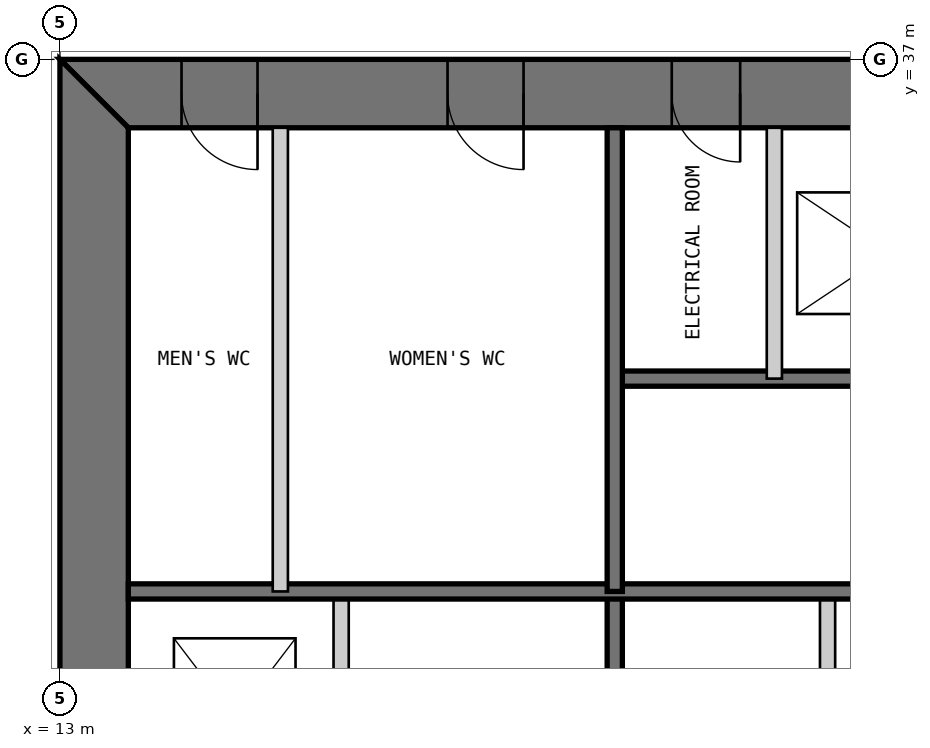
"""IFC4 building model, lengths in metres.
Left out: names, types, materials, properties, quantities, classifications, styles, units other than length and angle.
Written with IfcOpenShell. Run it as: python <this file> out.ifc"""

import sys

from ifc_helpers import new_model, si_unit, direction, frame, frame_2d, origin, place, context, subcontext, project, spatial, polyline, rectangle, outline, extrude, element, fill, save


model = new_model("IFC4")
c1 = context("Model", 3, precision=1e-05, world=origin(), true_north=direction((0.0, 1.0)))
c2 = subcontext(c1, "Body", "Model", "MODEL_VIEW")
j1 = project(units=[si_unit("LENGTHUNIT", "METRE"), si_unit("PLANEANGLEUNIT", "RADIAN")], contexts=[c1])
p1 = place(None, origin())
s1 = spatial("IfcSite", under=j1, at=p1, CompositionType="ELEMENT")
p2 = place(p1, origin())
s2 = spatial("IfcBuilding", under=s1, at=p2, CompositionType="ELEMENT")
p3 = place(p2, frame((0.0, 0.0, 79.0)))
s3 = spatial("IfcBuildingStorey", under=s2, at=p3, CompositionType="ELEMENT", Elevation=79.0)
p4 = place(p3, frame((37.0, 36.55, 0.0), z_axis=(0.0, 0.0, 1.0), x_axis=(-1.0, 0.0, 0.0)))
e1 = element("IfcWall", 1, at=p4, inside=s3, PredefinedType="SHEAR", context=c2, shape_type="SweptSolid", body=[
    extrude(outline(polyline([(0.0, -0.45), (24.0, -0.45), (23.1, 0.45), (0.9, 0.45), (0.0, -0.45)])), origin(), (0.0, 0.0, 1.0), 4.0),
])
p5 = place(p4, frame((4.9, 0.0, 0.0)))
e2 = element("IfcOpeningElement", 2, at=p5, cuts=e1, PredefinedType="OPENING", context=c2, shape_type="SweptSolid", body=[
    extrude(rectangle(XDim=1.0, YDim=2.2, at=frame_2d((0.5, 1.1))), frame((0.0, 0.46, 0.0), z_axis=(0.0, -1.0, 0.0), x_axis=(1.0, 0.0, 0.0)), (0.0, 0.0, 1.0), 0.92),
])
p6 = place(p4, frame((8.9, 0.0, 0.0)))
e3 = element("IfcOpeningElement", 3, at=p6, cuts=e1, PredefinedType="OPENING", context=c2, shape_type="SweptSolid", body=[
    extrude(rectangle(XDim=1.1, YDim=2.2, at=frame_2d((0.55, 1.1))), frame((0.0, 0.46, 0.0), z_axis=(0.0, -1.0, 0.0), x_axis=(1.0, 0.0, 0.0)), (0.0, 0.0, 1.0), 0.92),
])
p7 = place(p4, frame((15.05, 0.0, 0.0)))
e4 = element("IfcOpeningElement", 4, at=p7, cuts=e1, PredefinedType="OPENING", context=c2, shape_type="SweptSolid", body=[
    extrude(rectangle(XDim=0.9, YDim=2.2, at=frame_2d((0.45, 1.1))), frame((0.0, 0.46, 0.0), z_axis=(0.0, -1.0, 0.0), x_axis=(1.0, 0.0, 0.0)), (0.0, 0.0, 1.0), 0.92),
])
p8 = place(p4, frame((17.9, 0.0, 0.0)))
e5 = element("IfcOpeningElement", 5, at=p8, cuts=e1, PredefinedType="OPENING", context=c2, shape_type="SweptSolid", body=[
    extrude(rectangle(XDim=1.0, YDim=2.2, at=frame_2d((0.5, 1.1))), frame((0.0, 0.46, 0.0), z_axis=(0.0, -1.0, 0.0), x_axis=(1.0, 0.0, 0.0)), (0.0, 0.0, 1.0), 0.92),
])
p9 = place(p4, frame((21.4, 0.0, 0.0)))
e6 = element("IfcOpeningElement", 6, at=p9, cuts=e1, PredefinedType="OPENING", context=c2, shape_type="SweptSolid", body=[
    extrude(rectangle(XDim=1.0, YDim=2.2, at=frame_2d((0.5, 1.1))), frame((0.0, 0.46, 0.0), z_axis=(0.0, -1.0, 0.0), x_axis=(1.0, 0.0, 0.0)), (0.0, 0.0, 1.0), 0.92),
])
p10 = place(p3, frame((13.45, 36.1, 0.0), z_axis=(0.0, 0.0, 1.0), x_axis=(0.0, -1.0, 0.0)))
e7 = element("IfcWall", 7, at=p10, inside=s3, PredefinedType="SHEAR", context=c2, shape_type="SweptSolid", body=[
    extrude(outline(polyline([(-0.9, -0.45), (23.1, -0.45), (22.2, 0.45), (0.0, 0.45), (-0.9, -0.45)])), origin(), (0.0, 0.0, 1.0), 4.0),
])
p11 = place(p10, frame((20.2, 0.0, 0.0)))
e8 = element("IfcOpeningElement", 8, at=p11, cuts=e7, PredefinedType="OPENING", context=c2, shape_type="SweptSolid", body=[
    extrude(rectangle(XDim=1.0, YDim=2.2, at=frame_2d((0.5, 1.1))), frame((0.0, 0.46, 0.0), z_axis=(0.0, -1.0, 0.0), x_axis=(1.0, 0.0, 0.0)), (0.0, 0.0, 1.0), 0.92),
])
p12 = place(p10, frame((17.25, 0.0, 0.0)))
e9 = element("IfcOpeningElement", 9, at=p12, cuts=e7, PredefinedType="OPENING", context=c2, shape_type="SweptSolid", body=[
    extrude(rectangle(XDim=0.9, YDim=2.2, at=frame_2d((0.45, 1.1))), frame((0.0, 0.46, 0.0), z_axis=(0.0, -1.0, 0.0), x_axis=(1.0, 0.0, 0.0)), (0.0, 0.0, 1.0), 0.92),
])
p13 = place(p3, frame((16.7, 13.9, 0.0), z_axis=(0.0, 0.0, 1.0), x_axis=(0.0, 1.0, 0.0)))
e10 = element("IfcWall", 10, at=p13, inside=s3, PredefinedType="PARTITIONING", context=c2, shape_type="SweptSolid", body=[
    extrude(rectangle(XDim=16.1, YDim=0.2, at=frame_2d((8.05, 0.0))), origin(), (0.0, 0.0, 1.0), 3.8),
])
p14 = place(p13, frame((4.4, 0.0, 0.0)))
e11 = element("IfcOpeningElement", 11, at=p14, cuts=e10, PredefinedType="OPENING", context=c2, shape_type="SweptSolid", body=[
    extrude(rectangle(XDim=0.9, YDim=2.2, at=frame_2d((0.45, 1.1))), frame((0.0, 0.11, 0.0), z_axis=(0.0, -1.0, 0.0), x_axis=(1.0, 0.0, 0.0)), (0.0, 0.0, 1.0), 0.22),
])
p15 = place(p13, frame((7.217, 0.0, 0.0)))
e12 = element("IfcOpeningElement", 12, at=p15, cuts=e10, PredefinedType="OPENING", context=c2, shape_type="SweptSolid", body=[
    extrude(rectangle(XDim=1.1, YDim=2.2, at=frame_2d((0.55, 1.1))), frame((0.0, 0.11, 0.0), z_axis=(0.0, -1.0, 0.0), x_axis=(1.0, 0.0, 0.0)), (0.0, 0.0, 1.0), 0.22),
])
p16 = place(p13, frame((10.55, 0.0, 0.0)))
e13 = element("IfcOpeningElement", 13, at=p16, cuts=e10, PredefinedType="OPENING", context=c2, shape_type="SweptSolid", body=[
    extrude(rectangle(XDim=1.1, YDim=2.2, at=frame_2d((0.55, 1.1))), frame((0.0, 0.11, 0.0), z_axis=(0.0, -1.0, 0.0), x_axis=(1.0, 0.0, 0.0)), (0.0, 0.0, 1.0), 0.22),
])
p17 = place(p13, frame((13.883, 0.0, 0.0)))
e14 = element("IfcOpeningElement", 14, at=p17, cuts=e10, PredefinedType="OPENING", context=c2, shape_type="SweptSolid", body=[
    extrude(rectangle(XDim=1.1, YDim=2.2, at=frame_2d((0.55, 1.1))), frame((0.0, 0.11, 0.0), z_axis=(0.0, -1.0, 0.0), x_axis=(1.0, 0.0, 0.0)), (0.0, 0.0, 1.0), 0.22),
])
p18 = place(p3, frame((20.3, 13.9, 0.0), z_axis=(0.0, 0.0, 1.0), x_axis=(0.0, 1.0, 0.0)))
e15 = element("IfcWall", 15, at=p18, inside=s3, PredefinedType="SOLIDWALL", context=c2, shape_type="SweptSolid", body=[
    extrude(rectangle(XDim=16.1, YDim=0.2, at=frame_2d((8.05, 0.0))), origin(), (0.0, 0.0, 1.0), 3.8),
])
p19 = place(p3, frame((23.1, 20.0, 0.0), z_axis=(0.0, 0.0, 1.0), x_axis=(0.0, 1.0, 0.0)))
e16 = element("IfcWall", 16, at=p19, inside=s3, PredefinedType="PARTITIONING", context=c2, shape_type="SweptSolid", body=[
    extrude(rectangle(XDim=10.0, YDim=0.2, at=frame_2d((5.0, 0.0))), origin(), (0.0, 0.0, 1.0), 3.8),
])
p20 = place(p3, frame((29.7, 32.8, 0.0), z_axis=(0.0, 0.0, 1.0), x_axis=(-1.0, 0.0, 0.0)))
e17 = element("IfcWall", 17, at=p20, inside=s3, PredefinedType="SOLIDWALL", context=c2, shape_type="SweptSolid", body=[
    extrude(rectangle(XDim=9.4, YDim=0.2, at=frame_2d((4.7, 0.0))), origin(), (0.0, 0.0, 1.0), 3.8),
])
p21 = place(p20, frame((0.25, 0.0, 0.0)))
e18 = element("IfcOpeningElement", 18, at=p21, cuts=e17, PredefinedType="OPENING", context=c2, shape_type="SweptSolid", body=[
    extrude(rectangle(XDim=1.0, YDim=2.2, at=frame_2d((0.5, 1.1))), frame((0.0, 0.11, 0.0), z_axis=(0.0, -1.0, 0.0), x_axis=(1.0, 0.0, 0.0)), (0.0, 0.0, 1.0), 0.22),
])
p22 = place(p3, frame((29.7, 30.0, 0.0), z_axis=(0.0, 0.0, 1.0), x_axis=(-1.0, 0.0, 0.0)))
e19 = element("IfcWall", 19, at=p22, inside=s3, PredefinedType="SOLIDWALL", context=c2, shape_type="SweptSolid", body=[
    extrude(rectangle(XDim=15.8, YDim=0.2, at=frame_2d((7.9, 0.0))), origin(), (0.0, 0.0, 1.0), 3.8),
])
p23 = place(p3, frame((22.4, 36.1, 0.0), z_axis=(0.0, 0.0, 1.0), x_axis=(0.0, -1.0, 0.0)))
e20 = element("IfcWall", 20, at=p23, inside=s3, PredefinedType="PARTITIONING", context=c2, shape_type="SweptSolid", body=[
    extrude(rectangle(XDim=3.3, YDim=0.2, at=frame_2d((1.65, 0.0))), origin(), (0.0, 0.0, 1.0), 3.8),
])
p24 = place(p3, frame((20.3, 36.1, 0.0), z_axis=(0.0, 0.0, 1.0), x_axis=(0.0, -1.0, 0.0)))
e21 = element("IfcWall", 21, at=p24, inside=s3, PredefinedType="SOLIDWALL", context=c2, shape_type="SweptSolid", body=[
    extrude(rectangle(XDim=6.1, YDim=0.2, at=frame_2d((3.05, 0.0))), origin(), (0.0, 0.0, 1.0), 3.8),
])
p25 = place(p3, frame((15.9, 36.1, 0.0), z_axis=(0.0, 0.0, 1.0), x_axis=(0.0, -1.0, 0.0)))
e22 = element("IfcWall", 22, at=p25, inside=s3, PredefinedType="PARTITIONING", context=c2, shape_type="SweptSolid", body=[
    extrude(rectangle(XDim=6.1, YDim=0.2, at=frame_2d((3.05, 0.0))), origin(), (0.0, 0.0, 1.0), 3.8),
])
p26 = place(p7, origin())
e23 = element("IfcDoor", 23, at=p26, inside=s3, OperationType="SINGLE_SWING_LEFT", PredefinedType="DOOR", context=c2, shape_type="SweptSolid", body=[
    extrude(rectangle(XDim=0.9, YDim=2.2, at=frame_2d((0.45, 1.1))), frame((0.0, 0.025, 0.0), z_axis=(0.0, -1.0, 0.0), x_axis=(1.0, 0.0, 0.0)), (0.0, 0.0, 1.0), 0.05),
    extrude(outline(polyline([(0.0, 0.0), (0.04, 0.0), (0.04, 2.16), (0.86, 2.16), (0.86, 0.0), (0.9, 0.0), (0.9, 2.2), (0.0, 2.2), (0.0, 0.0)])), frame((0.0, 0.3, 0.0), z_axis=(0.0, -1.0, 0.0), x_axis=(1.0, 0.0, 0.0)), (0.0, 0.0, 1.0), 0.6),
])
fill(e4, e23)
p27 = place(p8, origin())
e24 = element("IfcDoor", 24, at=p27, inside=s3, OperationType="SINGLE_SWING_LEFT", PredefinedType="DOOR", context=c2, shape_type="SweptSolid", body=[
    extrude(rectangle(XDim=1.0, YDim=2.2, at=frame_2d((0.5, 1.1))), frame((0.0, 0.025, 0.0), z_axis=(0.0, -1.0, 0.0), x_axis=(1.0, 0.0, 0.0)), (0.0, 0.0, 1.0), 0.05),
    extrude(outline(polyline([(0.0, 0.0), (0.04, 0.0), (0.04, 2.16), (0.96, 2.16), (0.96, 0.0), (1.0, 0.0), (1.0, 2.2), (0.0, 2.2), (0.0, 0.0)])), frame((0.0, 0.3, 0.0), z_axis=(0.0, -1.0, 0.0), x_axis=(1.0, 0.0, 0.0)), (0.0, 0.0, 1.0), 0.6),
])
fill(e5, e24)
p28 = place(p9, origin())
e25 = element("IfcDoor", 25, at=p28, inside=s3, OperationType="SINGLE_SWING_LEFT", PredefinedType="DOOR", context=c2, shape_type="SweptSolid", body=[
    extrude(rectangle(XDim=1.0, YDim=2.2, at=frame_2d((0.5, 1.1))), frame((0.0, 0.025, 0.0), z_axis=(0.0, -1.0, 0.0), x_axis=(1.0, 0.0, 0.0)), (0.0, 0.0, 1.0), 0.05),
    extrude(outline(polyline([(0.0, 0.0), (0.04, 0.0), (0.04, 2.16), (0.96, 2.16), (0.96, 0.0), (1.0, 0.0), (1.0, 2.2), (0.0, 2.2), (0.0, 0.0)])), frame((0.0, 0.3, 0.0), z_axis=(0.0, -1.0, 0.0), x_axis=(1.0, 0.0, 0.0)), (0.0, 0.0, 1.0), 0.6),
])
fill(e6, e25)
save(model, sys.argv[1])
